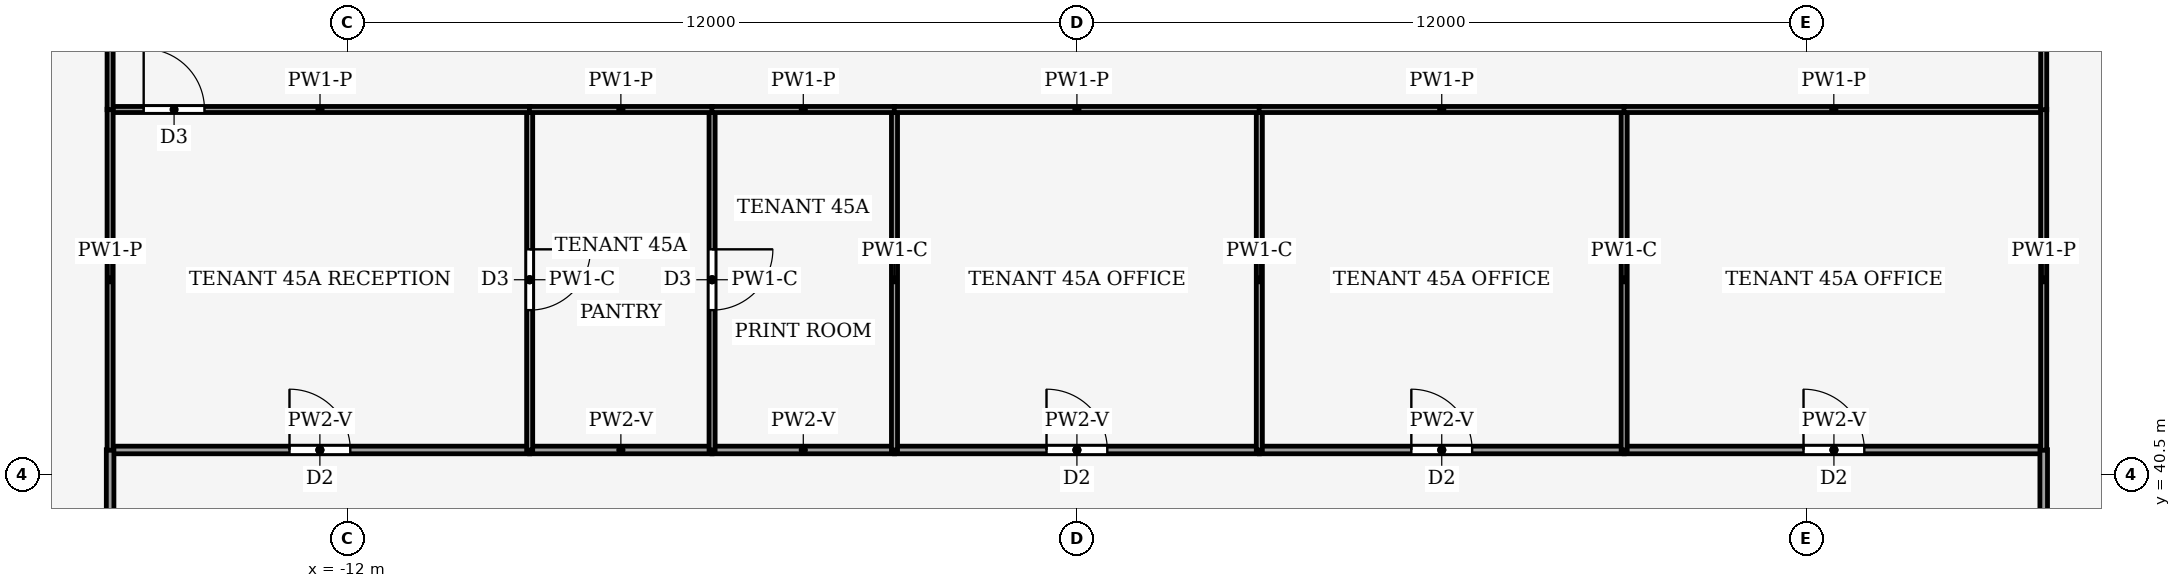
"""IFC4 building model, lengths in metres.
Left out: names, types, materials, properties, quantities, classifications, styles, units other than length and angle.
Written with IfcOpenShell. Run it as: python <this file> out.ifc"""

import sys

from ifc_helpers import new_model, si_unit, direction, frame, frame_2d, origin, place, context, subcontext, project, spatial, rectangle, extrude, element, fill, save


model = new_model("IFC4")
c1 = context("Model", 3, precision=1e-05, world=origin(), true_north=direction((0.0, 1.0)))
c2 = subcontext(c1, "Body", "Model", "MODEL_VIEW")
j1 = project(units=[si_unit("LENGTHUNIT", "METRE"), si_unit("PLANEANGLEUNIT", "RADIAN")], contexts=[c1])
p1 = place(None, origin())
s1 = spatial("IfcSite", under=j1, at=p1, CompositionType="ELEMENT")
p2 = place(p1, origin())
s2 = spatial("IfcBuilding", under=s1, at=p2, CompositionType="ELEMENT")
p3 = place(p2, frame((0.0, 0.0, 198.0)))
s3 = spatial("IfcBuildingStorey", under=s2, at=p3, CompositionType="ELEMENT", Elevation=198.0)
p4 = place(p3, frame((-15.9, 40.9, 0.0), z_axis=(0.0, 0.0, 1.0), x_axis=(1.0, 0.0, 0.0)))
e1 = element("IfcWall", 1, at=p4, inside=s3, PredefinedType="PARTITIONING", context=c2, shape_type="SweptSolid", body=[
    extrude(rectangle(XDim=6.9, YDim=0.125, at=frame_2d((3.45, 0.0))), origin(), (0.0, 0.0, 1.0), 3.44),
])
p5 = place(p4, frame((2.95, 0.0, 0.0)))
e2 = element("IfcOpeningElement", 2, at=p5, cuts=e1, PredefinedType="OPENING", context=c2, shape_type="SweptSolid", body=[
    extrude(rectangle(XDim=1.0, YDim=2.1, at=frame_2d((0.5, 1.05))), frame((0.0, 0.073, 0.0), z_axis=(0.0, -1.0, 0.0), x_axis=(1.0, 0.0, 0.0)), (0.0, 0.0, 1.0), 0.145),
])
for number, where, z_axis, x_axis in (
    (3, (-6.0, 40.9, 0.0), (0.0, 0.0, 1.0), (-1.0, 0.0, 0.0)),
    (4, (-3.0, 40.9, 0.0), (0.0, 0.0, 1.0), (-1.0, 0.0, 0.0)),
):
    element("IfcWall", number, at=place(p3, frame(where, z_axis=z_axis, x_axis=x_axis)), inside=s3, PredefinedType="PARTITIONING", context=c2, shape_type="SweptSolid", body=[
        extrude(rectangle(XDim=3.0, YDim=0.125, at=frame_2d((1.5, 0.0))), origin(), (0.0, 0.0, 1.0), 3.44),
    ])
p6 = place(p3, frame((-3.0, 40.9, 0.0), z_axis=(0.0, 0.0, 1.0), x_axis=(1.0, 0.0, 0.0)))
e5 = element("IfcWall", 5, at=p6, inside=s3, PredefinedType="PARTITIONING", context=c2, shape_type="SweptSolid", body=[
    extrude(rectangle(XDim=6.0, YDim=0.125, at=frame_2d((3.0, 0.0))), origin(), (0.0, 0.0, 1.0), 3.44),
])
p7 = place(p6, frame((2.5, 0.0, 0.0)))
e6 = element("IfcOpeningElement", 6, at=p7, cuts=e5, PredefinedType="OPENING", context=c2, shape_type="SweptSolid", body=[
    extrude(rectangle(XDim=1.0, YDim=2.1, at=frame_2d((0.5, 1.05))), frame((0.0, 0.073, 0.0), z_axis=(0.0, -1.0, 0.0), x_axis=(1.0, 0.0, 0.0)), (0.0, 0.0, 1.0), 0.145),
])
p8 = place(p3, frame((3.0, 40.9, 0.0), z_axis=(0.0, 0.0, 1.0), x_axis=(1.0, 0.0, 0.0)))
e7 = element("IfcWall", 7, at=p8, inside=s3, PredefinedType="PARTITIONING", context=c2, shape_type="SweptSolid", body=[
    extrude(rectangle(XDim=6.0, YDim=0.125, at=frame_2d((3.0, 0.0))), origin(), (0.0, 0.0, 1.0), 3.44),
])
p9 = place(p8, frame((2.5, 0.0, 0.0)))
e8 = element("IfcOpeningElement", 8, at=p9, cuts=e7, PredefinedType="OPENING", context=c2, shape_type="SweptSolid", body=[
    extrude(rectangle(XDim=1.0, YDim=2.1, at=frame_2d((0.5, 1.05))), frame((0.0, 0.073, 0.0), z_axis=(0.0, -1.0, 0.0), x_axis=(1.0, 0.0, 0.0)), (0.0, 0.0, 1.0), 0.145),
])
p10 = place(p3, frame((9.0, 40.9, 0.0), z_axis=(0.0, 0.0, 1.0), x_axis=(1.0, 0.0, 0.0)))
e9 = element("IfcWall", 9, at=p10, inside=s3, PredefinedType="PARTITIONING", context=c2, shape_type="SweptSolid", body=[
    extrude(rectangle(XDim=6.9, YDim=0.125, at=frame_2d((3.45, 0.0))), origin(), (0.0, 0.0, 1.0), 3.44),
])
p11 = place(p10, frame((2.95, 0.0, 0.0)))
e10 = element("IfcOpeningElement", 10, at=p11, cuts=e9, PredefinedType="OPENING", context=c2, shape_type="SweptSolid", body=[
    extrude(rectangle(XDim=1.0, YDim=2.1, at=frame_2d((0.5, 1.05))), frame((0.0, 0.073, 0.0), z_axis=(0.0, -1.0, 0.0), x_axis=(1.0, 0.0, 0.0)), (0.0, 0.0, 1.0), 0.145),
])
p12 = place(p3, frame((-15.9, 34.5, 0.0), z_axis=(0.0, 0.0, 1.0), x_axis=(0.0, 1.0, 0.0)))
e11 = element("IfcWall", 11, at=p12, inside=s3, PredefinedType="PARTITIONING", context=c2, shape_type="SweptSolid", body=[
    extrude(rectangle(XDim=6.404, YDim=0.125, at=frame_2d((3.202, 0.0))), origin(), (0.0, 0.0, 1.0), 3.14),
])
p13 = place(p12, frame((2.702, 0.0, 0.0)))
e12 = element("IfcOpeningElement", 12, at=p13, cuts=e11, PredefinedType="OPENING", context=c2, shape_type="SweptSolid", body=[
    extrude(rectangle(XDim=1.0, YDim=2.1, at=frame_2d((0.5, 1.05))), frame((0.0, 0.073, 0.0), z_axis=(0.0, -1.0, 0.0), x_axis=(1.0, 0.0, 0.0)), (0.0, 0.0, 1.0), 0.145),
])
p14 = place(p3, frame((15.9, 40.904, 0.0), z_axis=(0.0, 0.0, 1.0), x_axis=(0.0, -1.0, 0.0)))
e13 = element("IfcWall", 13, at=p14, inside=s3, PredefinedType="PARTITIONING", context=c2, shape_type="SweptSolid", body=[
    extrude(rectangle(XDim=3.404, YDim=0.125, at=frame_2d((1.702, 0.0))), origin(), (0.0, 0.0, 1.0), 3.14),
])
p15 = place(p14, frame((1.202, 0.0, 0.0)))
e14 = element("IfcOpeningElement", 14, at=p15, cuts=e13, PredefinedType="OPENING", context=c2, shape_type="SweptSolid", body=[
    extrude(rectangle(XDim=1.0, YDim=2.1, at=frame_2d((0.5, 1.05))), frame((0.0, 0.073, 0.0), z_axis=(0.0, -1.0, 0.0), x_axis=(1.0, 0.0, 0.0)), (0.0, 0.0, 1.0), 0.145),
])
p16 = place(p3, frame((-9.0, 46.5, 0.0), z_axis=(0.0, 0.0, 1.0), x_axis=(0.0, -1.0, 0.0)))
e15 = element("IfcWall", 15, at=p16, inside=s3, PredefinedType="PARTITIONING", context=c2, shape_type="SweptSolid", body=[
    extrude(rectangle(XDim=5.6, YDim=0.1, at=frame_2d((2.8, 0.0))), origin(), (0.0, 0.0, 1.0), 3.87),
])
p17 = place(p16, frame((2.3, 0.0, 0.0)))
e16 = element("IfcOpeningElement", 16, at=p17, cuts=e15, PredefinedType="OPENING", context=c2, shape_type="SweptSolid", body=[
    extrude(rectangle(XDim=1.0, YDim=2.1, at=frame_2d((0.5, 1.05))), frame((0.0, 0.06, 0.0), z_axis=(0.0, -1.0, 0.0), x_axis=(1.0, 0.0, 0.0)), (0.0, 0.0, 1.0), 0.12),
])
p18 = place(p3, frame((-15.9, 46.5, 0.0), z_axis=(0.0, 0.0, 1.0), x_axis=(1.0, 0.0, 0.0)))
e17 = element("IfcWall", 17, at=p18, inside=s3, PredefinedType="PARTITIONING", context=c2, shape_type="SweptSolid", body=[
    extrude(rectangle(XDim=6.904, YDim=0.1, at=frame_2d((3.452, 0.0))), origin(), (0.0, 0.0, 1.0), 3.44),
])
p19 = place(p18, frame((0.552, 0.0, 0.0)))
e18 = element("IfcOpeningElement", 18, at=p19, cuts=e17, PredefinedType="OPENING", context=c2, shape_type="SweptSolid", body=[
    extrude(rectangle(XDim=1.0, YDim=2.1, at=frame_2d((0.5, 1.05))), frame((0.0, 0.06, 0.0), z_axis=(0.0, -1.0, 0.0), x_axis=(1.0, 0.0, 0.0)), (0.0, 0.0, 1.0), 0.12),
])
p20 = place(p3, frame((-15.9, 46.504, 0.0), z_axis=(0.0, 0.0, 1.0), x_axis=(0.0, -1.0, 0.0)))
e19 = element("IfcWall", 19, at=p20, inside=s3, PredefinedType="PARTITIONING", context=c2, shape_type="SweptSolid", body=[
    extrude(rectangle(XDim=5.608, YDim=0.1, at=frame_2d((2.804, 0.0))), origin(), (0.0, 0.0, 1.0), 3.44),
])
p21 = place(p3, frame((-6.0, 46.5, 0.0), z_axis=(0.0, 0.0, 1.0), x_axis=(0.0, -1.0, 0.0)))
e20 = element("IfcWall", 20, at=p21, inside=s3, PredefinedType="PARTITIONING", context=c2, shape_type="SweptSolid", body=[
    extrude(rectangle(XDim=5.6, YDim=0.1, at=frame_2d((2.8, 0.0))), origin(), (0.0, 0.0, 1.0), 3.87),
])
p22 = place(p21, frame((2.3, 0.0, 0.0)))
e21 = element("IfcOpeningElement", 21, at=p22, cuts=e20, PredefinedType="OPENING", context=c2, shape_type="SweptSolid", body=[
    extrude(rectangle(XDim=1.0, YDim=2.1, at=frame_2d((0.5, 1.05))), frame((0.0, 0.06, 0.0), z_axis=(0.0, -1.0, 0.0), x_axis=(1.0, 0.0, 0.0)), (0.0, 0.0, 1.0), 0.12),
])
p23 = place(p3, frame((-5.996, 46.5, 0.0), z_axis=(0.0, 0.0, 1.0), x_axis=(-1.0, 0.0, 0.0)))
e22 = element("IfcWall", 22, at=p23, inside=s3, PredefinedType="PARTITIONING", context=c2, shape_type="SweptSolid", body=[
    extrude(rectangle(XDim=3.008, YDim=0.1, at=frame_2d((1.504, 0.0))), origin(), (0.0, 0.0, 1.0), 3.44),
])
p24 = place(p3, frame((-3.0, 40.9, 0.0), z_axis=(0.0, 0.0, 1.0), x_axis=(0.0, 1.0, 0.0)))
e23 = element("IfcWall", 23, at=p24, inside=s3, PredefinedType="PARTITIONING", context=c2, shape_type="SweptSolid", body=[
    extrude(rectangle(XDim=5.6, YDim=0.1, at=frame_2d((2.8, 0.0))), origin(), (0.0, 0.0, 1.0), 3.87),
])
p25 = place(p3, frame((-2.996, 46.5, 0.0), z_axis=(0.0, 0.0, 1.0), x_axis=(-1.0, 0.0, 0.0)))
e24 = element("IfcWall", 24, at=p25, inside=s3, PredefinedType="PARTITIONING", context=c2, shape_type="SweptSolid", body=[
    extrude(rectangle(XDim=3.008, YDim=0.1, at=frame_2d((1.504, 0.0))), origin(), (0.0, 0.0, 1.0), 3.44),
])
p26 = place(p3, frame((3.0, 40.9, 0.0), z_axis=(0.0, 0.0, 1.0), x_axis=(0.0, 1.0, 0.0)))
e25 = element("IfcWall", 25, at=p26, inside=s3, PredefinedType="PARTITIONING", context=c2, shape_type="SweptSolid", body=[
    extrude(rectangle(XDim=5.6, YDim=0.1, at=frame_2d((2.8, 0.0))), origin(), (0.0, 0.0, 1.0), 3.87),
])
p27 = place(p3, frame((3.004, 46.5, 0.0), z_axis=(0.0, 0.0, 1.0), x_axis=(-1.0, 0.0, 0.0)))
e26 = element("IfcWall", 26, at=p27, inside=s3, PredefinedType="PARTITIONING", context=c2, shape_type="SweptSolid", body=[
    extrude(rectangle(XDim=6.008, YDim=0.1, at=frame_2d((3.004, 0.0))), origin(), (0.0, 0.0, 1.0), 3.44),
])
p28 = place(p3, frame((9.0, 40.9, 0.0), z_axis=(0.0, 0.0, 1.0), x_axis=(0.0, 1.0, 0.0)))
e27 = element("IfcWall", 27, at=p28, inside=s3, PredefinedType="PARTITIONING", context=c2, shape_type="SweptSolid", body=[
    extrude(rectangle(XDim=5.6, YDim=0.1, at=frame_2d((2.8, 0.0))), origin(), (0.0, 0.0, 1.0), 3.87),
])
p29 = place(p3, frame((9.004, 46.5, 0.0), z_axis=(0.0, 0.0, 1.0), x_axis=(-1.0, 0.0, 0.0)))
e28 = element("IfcWall", 28, at=p29, inside=s3, PredefinedType="PARTITIONING", context=c2, shape_type="SweptSolid", body=[
    extrude(rectangle(XDim=6.008, YDim=0.1, at=frame_2d((3.004, 0.0))), origin(), (0.0, 0.0, 1.0), 3.44),
])
p30 = place(p3, frame((15.9, 46.5, 0.0), z_axis=(0.0, 0.0, 1.0), x_axis=(-1.0, 0.0, 0.0)))
e29 = element("IfcWall", 29, at=p30, inside=s3, PredefinedType="PARTITIONING", context=c2, shape_type="SweptSolid", body=[
    extrude(rectangle(XDim=6.904, YDim=0.1, at=frame_2d((3.452, 0.0))), origin(), (0.0, 0.0, 1.0), 3.44),
])
p31 = place(p3, frame((15.9, 40.896, 0.0), z_axis=(0.0, 0.0, 1.0), x_axis=(0.0, 1.0, 0.0)))
e30 = element("IfcWall", 30, at=p31, inside=s3, PredefinedType="PARTITIONING", context=c2, shape_type="SweptSolid", body=[
    extrude(rectangle(XDim=5.608, YDim=0.1, at=frame_2d((2.804, 0.0))), origin(), (0.0, 0.0, 1.0), 3.44),
])
for number, where, z_axis, x_axis in (
    (31, (-15.9, 61.504, 0.0), (0.0, 0.0, 1.0), (0.0, -1.0, 0.0)),
    (32, (15.9, 46.496, 0.0), (0.0, 0.0, 1.0), (0.0, 1.0, 0.0)),
):
    element("IfcWall", number, at=place(p3, frame(where, z_axis=z_axis, x_axis=x_axis)), inside=s3, PredefinedType="PARTITIONING", context=c2, shape_type="SweptSolid", body=[
        extrude(rectangle(XDim=15.008, YDim=0.1, at=frame_2d((7.504, 0.0))), origin(), (0.0, 0.0, 1.0), 3.24),
    ])
p32 = place(p5, origin())
e33 = element("IfcDoor", 33, at=p32, inside=s3, OperationType="SINGLE_SWING_LEFT", PredefinedType="DOOR", context=c2, shape_type="SweptSolid", body=[
    extrude(rectangle(XDim=1.0, YDim=2.1, at=frame_2d((0.5, 1.05))), frame((0.0, 0.025, 0.0), z_axis=(0.0, -1.0, 0.0), x_axis=(1.0, 0.0, 0.0)), (0.0, 0.0, 1.0), 0.05),
])
fill(e2, e33)
p33 = place(p7, origin())
e34 = element("IfcDoor", 34, at=p33, inside=s3, OperationType="SINGLE_SWING_RIGHT", PredefinedType="DOOR", context=c2, shape_type="SweptSolid", body=[
    extrude(rectangle(XDim=1.0, YDim=2.1, at=frame_2d((0.5, 1.05))), frame((0.0, 0.025, 0.0), z_axis=(0.0, -1.0, 0.0), x_axis=(1.0, 0.0, 0.0)), (0.0, 0.0, 1.0), 0.05),
])
fill(e6, e34)
p34 = place(p9, origin())
e35 = element("IfcDoor", 35, at=p34, inside=s3, OperationType="SINGLE_SWING_LEFT", PredefinedType="DOOR", context=c2, shape_type="SweptSolid", body=[
    extrude(rectangle(XDim=1.0, YDim=2.1, at=frame_2d((0.5, 1.05))), frame((0.0, 0.025, 0.0), z_axis=(0.0, -1.0, 0.0), x_axis=(1.0, 0.0, 0.0)), (0.0, 0.0, 1.0), 0.05),
])
fill(e8, e35)
p35 = place(p11, origin())
e36 = element("IfcDoor", 36, at=p35, inside=s3, OperationType="SINGLE_SWING_RIGHT", PredefinedType="DOOR", context=c2, shape_type="SweptSolid", body=[
    extrude(rectangle(XDim=1.0, YDim=2.1, at=frame_2d((0.5, 1.05))), frame((0.0, 0.025, 0.0), z_axis=(0.0, -1.0, 0.0), x_axis=(1.0, 0.0, 0.0)), (0.0, 0.0, 1.0), 0.05),
])
fill(e10, e36)
p36 = place(p17, origin())
e37 = element("IfcDoor", 37, at=p36, inside=s3, OperationType="SINGLE_SWING_RIGHT", PredefinedType="DOOR", context=c2, shape_type="SweptSolid", body=[
    extrude(rectangle(XDim=1.0, YDim=2.1, at=frame_2d((0.5, 1.05))), frame((0.0, 0.025, 0.0), z_axis=(0.0, -1.0, 0.0), x_axis=(1.0, 0.0, 0.0)), (0.0, 0.0, 1.0), 0.05),
])
fill(e16, e37)
p37 = place(p19, origin())
e38 = element("IfcDoor", 38, at=p37, inside=s3, OperationType="SINGLE_SWING_LEFT", PredefinedType="DOOR", context=c2, shape_type="SweptSolid", body=[
    extrude(rectangle(XDim=1.0, YDim=2.1, at=frame_2d((0.5, 1.05))), frame((0.0, 0.025, 0.0), z_axis=(0.0, -1.0, 0.0), x_axis=(1.0, 0.0, 0.0)), (0.0, 0.0, 1.0), 0.05),
])
fill(e18, e38)
p38 = place(p22, origin())
e39 = element("IfcDoor", 39, at=p38, inside=s3, OperationType="SINGLE_SWING_RIGHT", PredefinedType="DOOR", context=c2, shape_type="SweptSolid", body=[
    extrude(rectangle(XDim=1.0, YDim=2.1, at=frame_2d((0.5, 1.05))), frame((0.0, 0.025, 0.0), z_axis=(0.0, -1.0, 0.0), x_axis=(1.0, 0.0, 0.0)), (0.0, 0.0, 1.0), 0.05),
])
fill(e21, e39)
save(model, sys.argv[1])
